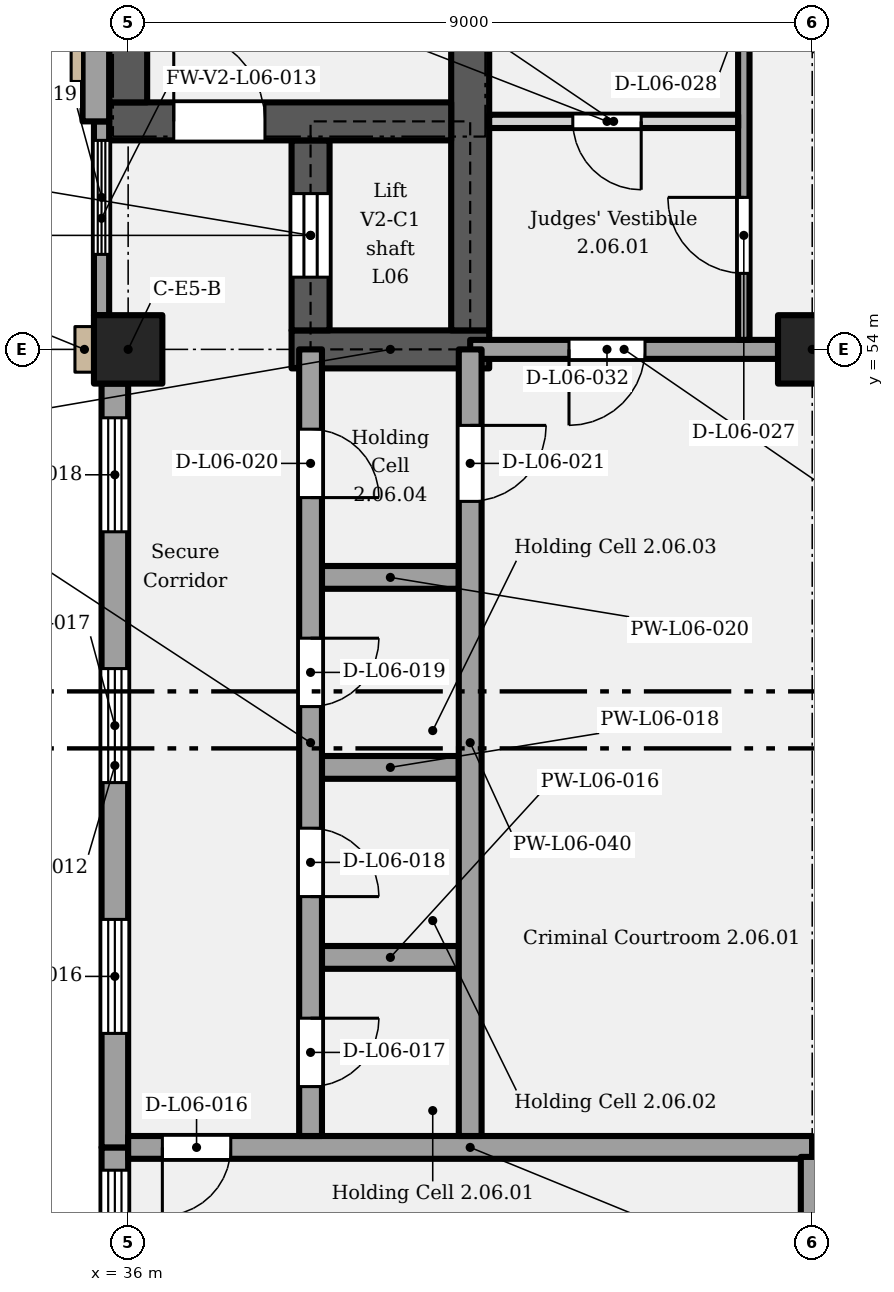
"""IFC4 building model, lengths in metres.
Left out: names, types, materials, properties, quantities, classifications, styles, units other than length and angle.
Written with IfcOpenShell. Run it as: python <this file> out.ifc"""

import sys

from ifc_helpers import new_model, si_unit, direction, frame, frame_2d, origin, origin_2d, place, context, subcontext, project, spatial, rectangle, extrude, element, fill, save


model = new_model("IFC4")
c1 = context("Model", 3, precision=1e-05, world=origin(), true_north=direction((0.0, 1.0)))
c2 = subcontext(c1, "Body", "Model", "MODEL_VIEW")
j1 = project(units=[si_unit("LENGTHUNIT", "METRE"), si_unit("PLANEANGLEUNIT", "RADIAN")], contexts=[c1])
p1 = place(None, origin())
s1 = spatial("IfcSite", under=j1, at=p1, CompositionType="ELEMENT")
p2 = place(p1, origin())
s2 = spatial("IfcBuilding", under=s1, at=p2, CompositionType="ELEMENT")
p3 = place(p2, frame((0.0, 0.0, 33.6)))
s3 = spatial("IfcBuildingStorey", under=s2, at=p3, CompositionType="ELEMENT", Elevation=33.6)
for number, where, z_axis, x_axis in (
    (1, (36.0, 54.0, 0.0), (0.0, 0.0, 1.0), (1.0, 0.0, 0.0)),
    (2, (45.0, 54.0, 0.0), (0.0, 0.0, 1.0), (1.0, 0.0, 0.0)),
):
    element("IfcColumn", number, at=place(p3, frame(where, z_axis=z_axis, x_axis=x_axis)), inside=s3, PredefinedType="COLUMN", context=c2, shape_type="SweptSolid", body=[
        extrude(rectangle(XDim=0.9, YDim=0.9, at=origin_2d()), origin(), (0.0, 0.0, 1.0), 5.4),
    ])
p4 = place(p3, frame((38.15, 54.0, 0.0), z_axis=(0.0, 0.0, 1.0), x_axis=(1.0, 0.0, 0.0)))
e3 = element("IfcWall", 3, at=p4, inside=s3, PredefinedType="SHEAR", context=c2, shape_type="SweptSolid", body=[
    extrude(rectangle(XDim=2.6, YDim=0.5, at=frame_2d((1.3, 0.0))), origin(), (0.0, 0.0, 1.0), 5.15),
])
p5 = place(p3, frame((38.4, 54.25, 0.0), z_axis=(0.0, 0.0, 1.0), x_axis=(0.0, 1.0, 0.0)))
e4 = element("IfcWall", 4, at=p5, inside=s3, PredefinedType="SHEAR", context=c2, shape_type="SweptSolid", body=[
    extrude(rectangle(XDim=2.5, YDim=0.5, at=frame_2d((1.25, 0.0))), origin(), (0.0, 0.0, 1.0), 5.15),
])
p6 = place(p5, frame((0.7, 0.0, 0.0)))
e5 = element("IfcOpeningElement", 5, at=p6, cuts=e4, PredefinedType="OPENING", context=c2, shape_type="SweptSolid", body=[
    extrude(rectangle(XDim=1.1, YDim=2.1, at=frame_2d((0.55, 1.05))), frame((0.0, 0.26, 0.0), z_axis=(0.0, -1.0, 0.0), x_axis=(1.0, 0.0, 0.0)), (0.0, 0.0, 1.0), 0.52),
])
p7 = place(p3, frame((40.5, 54.25, 0.0), z_axis=(0.0, 0.0, 1.0), x_axis=(0.0, 1.0, 0.0)))
e6 = element("IfcWall", 6, at=p7, inside=s3, PredefinedType="SHEAR", context=c2, shape_type="SweptSolid", body=[
    extrude(rectangle(XDim=11.5, YDim=0.5, at=frame_2d((5.75, 0.0))), origin(), (0.0, 0.0, 1.0), 5.15),
])
p8 = place(p3, frame((35.75, 57.0, 0.0), z_axis=(0.0, 0.0, 1.0), x_axis=(1.0, 0.0, 0.0)))
e7 = element("IfcWall", 7, at=p8, inside=s3, PredefinedType="SHEAR", context=c2, shape_type="SweptSolid", body=[
    extrude(rectangle(XDim=4.5, YDim=0.5, at=frame_2d((2.25, 0.0))), origin(), (0.0, 0.0, 1.0), 5.15),
])
p9 = place(p8, frame((0.85, 0.0, 0.0)))
e8 = element("IfcOpeningElement", 8, at=p9, cuts=e7, PredefinedType="OPENING", context=c2, shape_type="SweptSolid", body=[
    extrude(rectangle(XDim=1.2, YDim=2.1, at=frame_2d((0.6, 1.05))), frame((0.0, 0.26, 0.0), z_axis=(0.0, -1.0, 0.0), x_axis=(1.0, 0.0, 0.0)), (0.0, 0.0, 1.0), 0.52),
])
p10 = place(p3, frame((36.0, 57.25, 0.0), z_axis=(0.0, 0.0, 1.0), x_axis=(0.0, 1.0, 0.0)))
e9 = element("IfcWall", 9, at=p10, inside=s3, PredefinedType="SHEAR", context=c2, shape_type="SweptSolid", body=[
    extrude(rectangle(XDim=8.3, YDim=0.5, at=frame_2d((4.15, 0.0))), origin(), (0.0, 0.0, 1.0), 5.15),
])
p11 = place(p3, frame((35.825, 37.95, 0.0), z_axis=(0.0, 0.0, 1.0), x_axis=(0.0, 1.0, 0.0)))
e10 = element("IfcWall", 10, at=p11, inside=s3, PredefinedType="SOLIDWALL", context=c2, shape_type="SweptSolid", body=[
    extrude(rectangle(XDim=5.55, YDim=0.35, at=frame_2d((2.775, 0.0))), origin(), (0.0, 0.0, 1.0), 5.15),
])
p12 = place(p11, frame((0.45, 0.0, 1.05)))
e11 = element("IfcOpeningElement", 11, at=p12, cuts=e10, PredefinedType="OPENING", context=c2, shape_type="SweptSolid", body=[
    extrude(rectangle(XDim=1.5, YDim=3.5, at=frame_2d((0.75, 1.75))), frame((0.0, 0.185, 0.0), z_axis=(0.0, -1.0, 0.0), x_axis=(1.0, 0.0, 0.0)), (0.0, 0.0, 1.0), 0.37),
])
p13 = place(p11, frame((3.75, 0.0, 1.05)))
e12 = element("IfcOpeningElement", 12, at=p13, cuts=e10, PredefinedType="OPENING", context=c2, shape_type="SweptSolid", body=[
    extrude(rectangle(XDim=1.5, YDim=3.5, at=frame_2d((0.75, 1.75))), frame((0.0, 0.185, 0.0), z_axis=(0.0, -1.0, 0.0), x_axis=(1.0, 0.0, 0.0)), (0.0, 0.0, 1.0), 0.37),
])
p14 = place(p3, frame((35.825, 43.5, 0.0), z_axis=(0.0, 0.0, 1.0), x_axis=(0.0, 1.0, 0.0)))
e13 = element("IfcWall", 13, at=p14, inside=s3, PredefinedType="SOLIDWALL", context=c2, shape_type="SweptSolid", body=[
    extrude(rectangle(XDim=10.05, YDim=0.35, at=frame_2d((5.025, 0.0))), origin(), (0.0, 0.0, 1.0), 5.15),
])
p15 = place(p14, frame((1.5, 0.0, 1.05)))
e14 = element("IfcOpeningElement", 14, at=p15, cuts=e13, PredefinedType="OPENING", context=c2, shape_type="SweptSolid", body=[
    extrude(rectangle(XDim=1.5, YDim=3.5, at=frame_2d((0.75, 1.75))), frame((0.0, 0.185, 0.0), z_axis=(0.0, -1.0, 0.0), x_axis=(1.0, 0.0, 0.0)), (0.0, 0.0, 1.0), 0.37),
])
p16 = place(p14, frame((4.8, 0.0, 1.05)))
e15 = element("IfcOpeningElement", 15, at=p16, cuts=e13, PredefinedType="OPENING", context=c2, shape_type="SweptSolid", body=[
    extrude(rectangle(XDim=1.5, YDim=3.5, at=frame_2d((0.75, 1.75))), frame((0.0, 0.185, 0.0), z_axis=(0.0, -1.0, 0.0), x_axis=(1.0, 0.0, 0.0)), (0.0, 0.0, 1.0), 0.37),
])
p17 = place(p14, frame((8.1, 0.0, 1.05)))
e16 = element("IfcOpeningElement", 16, at=p17, cuts=e13, PredefinedType="OPENING", context=c2, shape_type="SweptSolid", body=[
    extrude(rectangle(XDim=1.5, YDim=3.5, at=frame_2d((0.75, 1.75))), frame((0.0, 0.185, 0.0), z_axis=(0.0, -1.0, 0.0), x_axis=(1.0, 0.0, 0.0)), (0.0, 0.0, 1.0), 0.37),
])
p18 = place(p3, frame((35.65, 54.45, 0.0), z_axis=(0.0, 0.0, 1.0), x_axis=(0.0, 1.0, 0.0)))
e17 = element("IfcWall", 17, at=p18, inside=s3, PredefinedType="SOLIDWALL", context=c2, shape_type="SweptSolid", body=[
    extrude(rectangle(XDim=2.55, YDim=0.2, at=frame_2d((1.275, 0.0))), origin(), (0.0, 0.0, 1.0), 5.15),
])
p19 = place(p18, frame((0.8, 0.0, 1.05)))
e18 = element("IfcOpeningElement", 18, at=p19, cuts=e17, PredefinedType="OPENING", context=c2, shape_type="SweptSolid", body=[
    extrude(rectangle(XDim=1.5, YDim=3.5, at=frame_2d((0.75, 1.75))), frame((0.0, 0.11, 0.0), z_axis=(0.0, -1.0, 0.0), x_axis=(1.0, 0.0, 0.0)), (0.0, 0.0, 1.0), 0.22),
])
p20 = place(p3, frame((35.575, 57.0, 0.0), z_axis=(0.0, 0.0, 1.0), x_axis=(0.0, 1.0, 0.0)))
e19 = element("IfcWall", 19, at=p20, inside=s3, PredefinedType="SOLIDWALL", context=c2, shape_type="SweptSolid", body=[
    extrude(rectangle(XDim=8.55, YDim=0.35, at=frame_2d((4.275, 0.0))), origin(), (0.0, 0.0, 1.0), 5.15),
])
p21 = place(p3, frame((36.0, 43.5, 0.0), z_axis=(0.0, 0.0, 1.0), x_axis=(1.0, 0.0, 0.0)))
e20 = element("IfcWall", 20, at=p21, inside=s3, PredefinedType="PARTITIONING", context=c2, shape_type="SweptSolid", body=[
    extrude(rectangle(XDim=9.0, YDim=0.3, at=frame_2d((4.5, 0.0))), origin(), (0.0, 0.0, 1.0), 5.15),
])
p22 = place(p21, frame((1.35, 0.0, 0.0), z_axis=(0.0, 0.0, 1.0), x_axis=(-1.0, 0.0, 0.0)))
e21 = element("IfcOpeningElement", 21, at=p22, cuts=e20, PredefinedType="OPENING", context=c2, shape_type="SweptSolid", body=[
    extrude(rectangle(XDim=0.9, YDim=2.1, at=frame_2d((0.45, 1.05))), frame((0.0, 0.16, 0.0), z_axis=(0.0, -1.0, 0.0), x_axis=(1.0, 0.0, 0.0)), (0.0, 0.0, 1.0), 0.32),
])
p23 = place(p3, frame((45.0, 43.5, 0.0), z_axis=(0.0, 0.0, 1.0), x_axis=(1.0, 0.0, 0.0)))
e22 = element("IfcWall", 22, at=p23, inside=s3, PredefinedType="PARTITIONING", context=c2, shape_type="SweptSolid", body=[
    extrude(rectangle(XDim=4.625, YDim=0.25, at=frame_2d((2.312, 0.0))), origin(), (0.0, 0.0, 1.0), 5.15),
])
for number, where, z_axis, x_axis in (
    (23, (38.55, 46.0, 0.0), (0.0, 0.0, 1.0), (1.0, 0.0, 0.0)),
    (24, (38.55, 48.5, 0.0), (0.0, 0.0, 1.0), (1.0, 0.0, 0.0)),
    (25, (38.55, 51.0, 0.0), (0.0, 0.0, 1.0), (1.0, 0.0, 0.0)),
):
    element("IfcWall", number, at=place(p3, frame(where, z_axis=z_axis, x_axis=x_axis)), inside=s3, PredefinedType="PARTITIONING", context=c2, shape_type="SweptSolid", body=[
        extrude(rectangle(XDim=1.8, YDim=0.3, at=frame_2d((0.9, 0.0))), origin(), (0.0, 0.0, 1.0), 5.15),
    ])
p24 = place(p3, frame((40.5, 54.0, 0.0), z_axis=(0.0, 0.0, 1.0), x_axis=(1.0, 0.0, 0.0)))
e26 = element("IfcWall", 26, at=p24, inside=s3, PredefinedType="PARTITIONING", context=c2, shape_type="SweptSolid", body=[
    extrude(rectangle(XDim=4.05, YDim=0.25, at=frame_2d((2.025, 0.0))), origin(), (0.0, 0.0, 1.0), 4.4),
])
p25 = place(p24, frame((2.3, 0.0, 0.0), z_axis=(0.0, 0.0, 1.0), x_axis=(-1.0, 0.0, 0.0)))
e27 = element("IfcOpeningElement", 27, at=p25, cuts=e26, PredefinedType="OPENING", context=c2, shape_type="SweptSolid", body=[
    extrude(rectangle(XDim=1.0, YDim=2.1, at=frame_2d((0.5, 1.05))), frame((0.0, 0.135, 0.0), z_axis=(0.0, -1.0, 0.0), x_axis=(1.0, 0.0, 0.0)), (0.0, 0.0, 1.0), 0.27),
])
p26 = place(p3, frame((40.75, 57.0, 0.0), z_axis=(0.0, 0.0, 1.0), x_axis=(1.0, 0.0, 0.0)))
e28 = element("IfcWall", 28, at=p26, inside=s3, PredefinedType="PARTITIONING", context=c2, shape_type="SweptSolid", body=[
    extrude(rectangle(XDim=3.275, YDim=0.175, at=frame_2d((1.637, 0.0))), origin(), (0.0, 0.0, 1.0), 5.15),
])
p27 = place(p26, frame((2.0, 0.0, 0.0), z_axis=(0.0, 0.0, 1.0), x_axis=(-1.0, 0.0, 0.0)))
e29 = element("IfcOpeningElement", 29, at=p27, cuts=e28, PredefinedType="OPENING", context=c2, shape_type="SweptSolid", body=[
    extrude(rectangle(XDim=0.9, YDim=2.1, at=frame_2d((0.45, 1.05))), frame((0.0, 0.097, 0.0), z_axis=(0.0, -1.0, 0.0), x_axis=(1.0, 0.0, 0.0)), (0.0, 0.0, 1.0), 0.195),
])
p28 = place(p3, frame((38.4, 43.65, 0.0), z_axis=(0.0, 0.0, 1.0), x_axis=(0.0, 1.0, 0.0)))
e30 = element("IfcWall", 30, at=p28, inside=s3, PredefinedType="PARTITIONING", context=c2, shape_type="SweptSolid", body=[
    extrude(rectangle(XDim=10.35, YDim=0.3, at=frame_2d((5.175, 0.0))), origin(), (0.0, 0.0, 1.0), 5.15),
])
p29 = place(p28, frame((1.55, 0.0, 0.0), z_axis=(0.0, 0.0, 1.0), x_axis=(-1.0, 0.0, 0.0)))
e31 = element("IfcOpeningElement", 31, at=p29, cuts=e30, PredefinedType="OPENING", context=c2, shape_type="SweptSolid", body=[
    extrude(rectangle(XDim=0.9, YDim=2.0, at=frame_2d((0.45, 1.0))), frame((0.0, 0.16, 0.0), z_axis=(0.0, -1.0, 0.0), x_axis=(1.0, 0.0, 0.0)), (0.0, 0.0, 1.0), 0.32),
])
p30 = place(p28, frame((4.05, 0.0, 0.0), z_axis=(0.0, 0.0, 1.0), x_axis=(-1.0, 0.0, 0.0)))
e32 = element("IfcOpeningElement", 32, at=p30, cuts=e30, PredefinedType="OPENING", context=c2, shape_type="SweptSolid", body=[
    extrude(rectangle(XDim=0.9, YDim=2.0, at=frame_2d((0.45, 1.0))), frame((0.0, 0.16, 0.0), z_axis=(0.0, -1.0, 0.0), x_axis=(1.0, 0.0, 0.0)), (0.0, 0.0, 1.0), 0.32),
])
p31 = place(p28, frame((6.55, 0.0, 0.0), z_axis=(0.0, 0.0, 1.0), x_axis=(-1.0, 0.0, 0.0)))
e33 = element("IfcOpeningElement", 33, at=p31, cuts=e30, PredefinedType="OPENING", context=c2, shape_type="SweptSolid", body=[
    extrude(rectangle(XDim=0.9, YDim=2.0, at=frame_2d((0.45, 1.0))), frame((0.0, 0.16, 0.0), z_axis=(0.0, -1.0, 0.0), x_axis=(1.0, 0.0, 0.0)), (0.0, 0.0, 1.0), 0.32),
])
p32 = place(p28, frame((9.3, 0.0, 0.0), z_axis=(0.0, 0.0, 1.0), x_axis=(-1.0, 0.0, 0.0)))
e34 = element("IfcOpeningElement", 34, at=p32, cuts=e30, PredefinedType="OPENING", context=c2, shape_type="SweptSolid", body=[
    extrude(rectangle(XDim=0.9, YDim=2.0, at=frame_2d((0.45, 1.0))), frame((0.0, 0.16, 0.0), z_axis=(0.0, -1.0, 0.0), x_axis=(1.0, 0.0, 0.0)), (0.0, 0.0, 1.0), 0.32),
])
p33 = place(p3, frame((40.5, 43.65, 0.0), z_axis=(0.0, 0.0, 1.0), x_axis=(0.0, 1.0, 0.0)))
e35 = element("IfcWall", 35, at=p33, inside=s3, PredefinedType="PARTITIONING", context=c2, shape_type="SweptSolid", body=[
    extrude(rectangle(XDim=10.35, YDim=0.3, at=frame_2d((5.175, 0.0))), origin(), (0.0, 0.0, 1.0), 5.15),
])
p34 = place(p33, frame((9.35, 0.0, 0.0), z_axis=(0.0, 0.0, 1.0), x_axis=(-1.0, 0.0, 0.0)))
e36 = element("IfcOpeningElement", 36, at=p34, cuts=e35, PredefinedType="OPENING", context=c2, shape_type="SweptSolid", body=[
    extrude(rectangle(XDim=1.0, YDim=2.0, at=frame_2d((0.5, 1.0))), frame((0.0, 0.16, 0.0), z_axis=(0.0, -1.0, 0.0), x_axis=(1.0, 0.0, 0.0)), (0.0, 0.0, 1.0), 0.32),
])
p35 = place(p3, frame((44.1, 54.125, 0.0), z_axis=(0.0, 0.0, 1.0), x_axis=(0.0, 1.0, 0.0)))
e37 = element("IfcWall", 37, at=p35, inside=s3, PredefinedType="PARTITIONING", context=c2, shape_type="SweptSolid", body=[
    extrude(rectangle(XDim=8.8, YDim=0.15, at=frame_2d((4.4, 0.0))), origin(), (0.0, 0.0, 1.0), 5.15),
])
p36 = place(p35, frame((0.875, 0.0, 0.0)))
e38 = element("IfcOpeningElement", 38, at=p36, cuts=e37, PredefinedType="OPENING", context=c2, shape_type="SweptSolid", body=[
    extrude(rectangle(XDim=1.0, YDim=2.1, at=frame_2d((0.5, 1.05))), frame((0.0, 0.085, 0.0), z_axis=(0.0, -1.0, 0.0), x_axis=(1.0, 0.0, 0.0)), (0.0, 0.0, 1.0), 0.17),
])
p37 = place(p35, frame((3.925, 0.0, 0.0)))
e39 = element("IfcOpeningElement", 39, at=p37, cuts=e37, PredefinedType="OPENING", context=c2, shape_type="SweptSolid", body=[
    extrude(rectangle(XDim=0.9, YDim=2.1, at=frame_2d((0.45, 1.05))), frame((0.0, 0.085, 0.0), z_axis=(0.0, -1.0, 0.0), x_axis=(1.0, 0.0, 0.0)), (0.0, 0.0, 1.0), 0.17),
])
p38 = place(p35, frame((6.925, 0.0, 0.0)))
e40 = element("IfcOpeningElement", 40, at=p38, cuts=e37, PredefinedType="OPENING", context=c2, shape_type="SweptSolid", body=[
    extrude(rectangle(XDim=0.9, YDim=2.1, at=frame_2d((0.45, 1.05))), frame((0.0, 0.085, 0.0), z_axis=(0.0, -1.0, 0.0), x_axis=(1.0, 0.0, 0.0)), (0.0, 0.0, 1.0), 0.17),
])
p39 = place(p3, frame((45.0, 37.95, 0.0), z_axis=(0.0, 0.0, 1.0), x_axis=(0.0, 1.0, 0.0)))
e41 = element("IfcWall", 41, at=p39, inside=s3, PredefinedType="PARTITIONING", context=c2, shape_type="SweptSolid", body=[
    extrude(rectangle(XDim=5.425, YDim=0.3, at=frame_2d((2.712, 0.0))), origin(), (0.0, 0.0, 1.0), 4.2),
])
p40 = place(p13, origin())
e42 = element("IfcWindow", 42, at=p40, inside=s3, PartitioningType="SINGLE_PANEL", PredefinedType="WINDOW", context=c2, shape_type="SweptSolid", body=[
    extrude(rectangle(XDim=1.5, YDim=3.5, at=frame_2d((0.75, 1.75))), frame((0.0, 0.03, 0.0), z_axis=(0.0, -1.0, 0.0), x_axis=(1.0, 0.0, 0.0)), (0.0, 0.0, 1.0), 0.06),
])
fill(e12, e42)
p41 = place(p15, origin())
e43 = element("IfcWindow", 43, at=p41, inside=s3, PartitioningType="SINGLE_PANEL", PredefinedType="WINDOW", context=c2, shape_type="SweptSolid", body=[
    extrude(rectangle(XDim=1.5, YDim=3.5, at=frame_2d((0.75, 1.75))), frame((0.0, 0.03, 0.0), z_axis=(0.0, -1.0, 0.0), x_axis=(1.0, 0.0, 0.0)), (0.0, 0.0, 1.0), 0.06),
])
fill(e14, e43)
p42 = place(p16, origin())
e44 = element("IfcWindow", 44, at=p42, inside=s3, PartitioningType="SINGLE_PANEL", PredefinedType="WINDOW", context=c2, shape_type="SweptSolid", body=[
    extrude(rectangle(XDim=1.5, YDim=3.5, at=frame_2d((0.75, 1.75))), frame((0.0, 0.03, 0.0), z_axis=(0.0, -1.0, 0.0), x_axis=(1.0, 0.0, 0.0)), (0.0, 0.0, 1.0), 0.06),
])
fill(e15, e44)
p43 = place(p17, origin())
e45 = element("IfcWindow", 45, at=p43, inside=s3, PartitioningType="SINGLE_PANEL", PredefinedType="WINDOW", context=c2, shape_type="SweptSolid", body=[
    extrude(rectangle(XDim=1.5, YDim=3.5, at=frame_2d((0.75, 1.75))), frame((0.0, 0.03, 0.0), z_axis=(0.0, -1.0, 0.0), x_axis=(1.0, 0.0, 0.0)), (0.0, 0.0, 1.0), 0.06),
])
fill(e16, e45)
p44 = place(p19, origin())
e46 = element("IfcWindow", 46, at=p44, inside=s3, PartitioningType="SINGLE_PANEL", PredefinedType="WINDOW", context=c2, shape_type="SweptSolid", body=[
    extrude(rectangle(XDim=1.5, YDim=3.5, at=frame_2d((0.75, 1.75))), frame((0.0, 0.03, 0.0), z_axis=(0.0, -1.0, 0.0), x_axis=(1.0, 0.0, 0.0)), (0.0, 0.0, 1.0), 0.06),
])
fill(e18, e46)
p45 = place(p6, origin())
e47 = element("IfcDoor", 47, at=p45, inside=s3, OperationType="SLIDING_TO_LEFT", PredefinedType="DOOR", context=c2, shape_type="SweptSolid", body=[
    extrude(rectangle(XDim=1.1, YDim=2.1, at=frame_2d((0.55, 1.05))), frame((0.0, 0.025, 0.0), z_axis=(0.0, -1.0, 0.0), x_axis=(1.0, 0.0, 0.0)), (0.0, 0.0, 1.0), 0.05),
])
fill(e5, e47)
p46 = place(p9, origin())
e48 = element("IfcDoor", 48, at=p46, inside=s3, OperationType="SINGLE_SWING_LEFT", PredefinedType="DOOR", context=c2, shape_type="SweptSolid", body=[
    extrude(rectangle(XDim=1.2, YDim=2.1, at=frame_2d((0.6, 1.05))), frame((0.0, 0.025, 0.0), z_axis=(0.0, -1.0, 0.0), x_axis=(1.0, 0.0, 0.0)), (0.0, 0.0, 1.0), 0.05),
])
fill(e8, e48)
p47 = place(p22, origin())
e49 = element("IfcDoor", 49, at=p47, inside=s3, OperationType="SINGLE_SWING_RIGHT", PredefinedType="DOOR", context=c2, shape_type="SweptSolid", body=[
    extrude(rectangle(XDim=0.9, YDim=2.1, at=frame_2d((0.45, 1.05))), frame((0.0, 0.025, 0.0), z_axis=(0.0, -1.0, 0.0), x_axis=(1.0, 0.0, 0.0)), (0.0, 0.0, 1.0), 0.05),
])
fill(e21, e49)
p48 = place(p29, origin())
e50 = element("IfcDoor", 50, at=p48, inside=s3, OperationType="SINGLE_SWING_LEFT", PredefinedType="DOOR", context=c2, shape_type="SweptSolid", body=[
    extrude(rectangle(XDim=0.9, YDim=2.0, at=frame_2d((0.45, 1.0))), frame((0.0, 0.025, 0.0), z_axis=(0.0, -1.0, 0.0), x_axis=(1.0, 0.0, 0.0)), (0.0, 0.0, 1.0), 0.05),
])
fill(e31, e50)
p49 = place(p30, origin())
e51 = element("IfcDoor", 51, at=p49, inside=s3, OperationType="SINGLE_SWING_RIGHT", PredefinedType="DOOR", context=c2, shape_type="SweptSolid", body=[
    extrude(rectangle(XDim=0.9, YDim=2.0, at=frame_2d((0.45, 1.0))), frame((0.0, 0.025, 0.0), z_axis=(0.0, -1.0, 0.0), x_axis=(1.0, 0.0, 0.0)), (0.0, 0.0, 1.0), 0.05),
])
fill(e32, e51)
p50 = place(p31, origin())
e52 = element("IfcDoor", 52, at=p50, inside=s3, OperationType="SINGLE_SWING_LEFT", PredefinedType="DOOR", context=c2, shape_type="SweptSolid", body=[
    extrude(rectangle(XDim=0.9, YDim=2.0, at=frame_2d((0.45, 1.0))), frame((0.0, 0.025, 0.0), z_axis=(0.0, -1.0, 0.0), x_axis=(1.0, 0.0, 0.0)), (0.0, 0.0, 1.0), 0.05),
])
fill(e33, e52)
p51 = place(p32, origin())
e53 = element("IfcDoor", 53, at=p51, inside=s3, OperationType="SINGLE_SWING_RIGHT", PredefinedType="DOOR", context=c2, shape_type="SweptSolid", body=[
    extrude(rectangle(XDim=0.9, YDim=2.0, at=frame_2d((0.45, 1.0))), frame((0.0, 0.025, 0.0), z_axis=(0.0, -1.0, 0.0), x_axis=(1.0, 0.0, 0.0)), (0.0, 0.0, 1.0), 0.05),
])
fill(e34, e53)
p52 = place(p34, origin())
e54 = element("IfcDoor", 54, at=p52, inside=s3, OperationType="SINGLE_SWING_LEFT", PredefinedType="DOOR", context=c2, shape_type="SweptSolid", body=[
    extrude(rectangle(XDim=1.0, YDim=2.0, at=frame_2d((0.5, 1.0))), frame((0.0, 0.025, 0.0), z_axis=(0.0, -1.0, 0.0), x_axis=(1.0, 0.0, 0.0)), (0.0, 0.0, 1.0), 0.05),
])
fill(e36, e54)
p53 = place(p36, origin())
e55 = element("IfcDoor", 55, at=p53, inside=s3, OperationType="SINGLE_SWING_RIGHT", PredefinedType="DOOR", context=c2, shape_type="SweptSolid", body=[
    extrude(rectangle(XDim=1.0, YDim=2.1, at=frame_2d((0.5, 1.05))), frame((0.0, 0.025, 0.0), z_axis=(0.0, -1.0, 0.0), x_axis=(1.0, 0.0, 0.0)), (0.0, 0.0, 1.0), 0.05),
])
fill(e38, e55)
p54 = place(p27, origin())
e56 = element("IfcDoor", 56, at=p54, inside=s3, OperationType="SINGLE_SWING_LEFT", PredefinedType="DOOR", context=c2, shape_type="SweptSolid", body=[
    extrude(rectangle(XDim=0.9, YDim=2.1, at=frame_2d((0.45, 1.05))), frame((0.0, 0.025, 0.0), z_axis=(0.0, -1.0, 0.0), x_axis=(1.0, 0.0, 0.0)), (0.0, 0.0, 1.0), 0.05),
])
fill(e29, e56)
p55 = place(p25, origin())
e57 = element("IfcDoor", 57, at=p55, inside=s3, OperationType="SINGLE_SWING_RIGHT", PredefinedType="DOOR", context=c2, shape_type="SweptSolid", body=[
    extrude(rectangle(XDim=1.0, YDim=2.1, at=frame_2d((0.5, 1.05))), frame((0.0, 0.025, 0.0), z_axis=(0.0, -1.0, 0.0), x_axis=(1.0, 0.0, 0.0)), (0.0, 0.0, 1.0), 0.05),
])
fill(e27, e57)
save(model, sys.argv[1])
